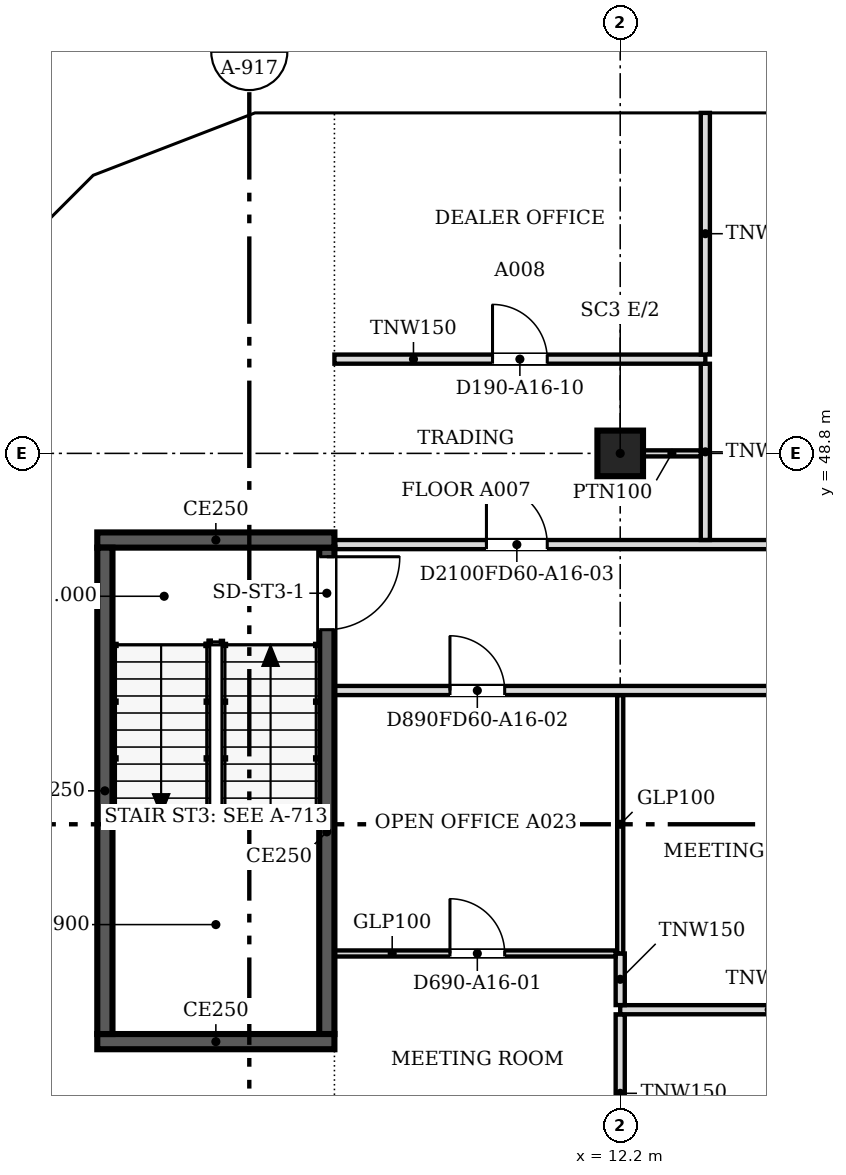
"""IFC4 building model, lengths in metres.
Left out: names, types, materials, properties, quantities, classifications, styles, units other than length and angle.
Written with IfcOpenShell. Run it as: python <this file> out.ifc"""

import sys

from ifc_helpers import new_model, si_unit, direction, frame, frame_2d, origin, origin_2d, place, context, subcontext, project, spatial, polyline, rectangle, outline, extrude, faceted_brep, source, transform, mapped, element, fill, save


model = new_model("IFC4")
c1 = context("Model", 3, precision=1e-05, world=origin(), true_north=direction((0.0, 1.0)))
c2 = subcontext(c1, "Body", "Model", "MODEL_VIEW")
j1 = project(units=[si_unit("LENGTHUNIT", "METRE"), si_unit("PLANEANGLEUNIT", "RADIAN")], contexts=[c1])
p1 = place(None, origin())
s1 = spatial("IfcSite", under=j1, at=p1, CompositionType="ELEMENT")
p2 = place(p1, origin())
s2 = spatial("IfcBuilding", under=s1, at=p2, CompositionType="ELEMENT")
p3 = place(p2, frame((0.0, 0.0, 178.2)))
s3 = spatial("IfcBuildingStorey", under=s2, at=p3, CompositionType="ELEMENT", Elevation=178.2)
p4 = place(p3, frame((12.2, 48.8, 0.0), z_axis=(0.0, 0.0, 1.0), x_axis=(1.0, 0.0, 0.0)))
e1 = element("IfcColumn", 1, at=p4, inside=s3, PredefinedType="COLUMN", context=c2, shape_type="SweptSolid", body=[
    extrude(rectangle(XDim=0.75, YDim=0.75, at=origin_2d()), origin(), (0.0, 0.0, 1.0), 3.6),
])
m1 = source(origin(), c2, "Body", "SweptSolid", [
    extrude(outline(polyline([(3.05, 0.0), (6.1, 3.8), (3.05, 7.6), (0.0, 3.8), (3.05, 0.0)])), frame((0.0, 0.25, 0.0), z_axis=(0.0, -1.0, 0.0), x_axis=(1.0, 0.0, 0.0)), (0.0, 0.0, 1.0), 0.5),
])
p5 = place(p3, frame((15.25, 54.65, -3.8), z_axis=(0.0, 0.0, 1.0), x_axis=(-1.0, 0.0, 0.0)))
e2 = element("IfcWall", 2, at=p5, inside=s3, PredefinedType="SOLIDWALL", context=c2, shape_type="MappedRepresentation", body=[
    mapped(m1, transform((0.0, 0.0, 0.0), scale=1.0)),
])
m2 = source(origin(), c2, "Body", "SweptSolid", [
    extrude(outline(polyline([(3.05, 0.399), (5.78, 3.8), (3.05, 7.201), (0.321, 3.8), (3.05, 0.399)])), frame((0.0, 0.26, 0.0), z_axis=(0.0, -1.0, 0.0), x_axis=(1.0, 0.0, 0.0)), (0.0, 0.0, 1.0), 0.52),
])
p6 = place(p5, origin())
e3 = element("IfcOpeningElement", 3, at=p6, cuts=e2, PredefinedType="OPENING", context=c2, shape_type="MappedRepresentation", body=[
    mapped(m2, transform((0.0, 0.0, 0.0), scale=1.0)),
])
m3 = source(origin(), c2, "Body", "Brep", [
    faceted_brep([(3.003, -0.25, 0.0), (3.05, -0.25, 0.06), (3.05, -0.25, 7.54), (3.003, -0.25, 7.6), (0.0, -0.25, 3.8), (0.0, 0.25, 3.8), (2.957, 0.25, 7.541), (2.957, 0.25, 0.059), (3.003, 0.0, 0.0), (3.003, 0.0, 7.6)], [[[0, 1, 2, 3, 4]], [[5, 6, 7]], [[1, 0, 8]], [[9, 3, 2]], [[6, 5, 4, 3, 9]], [[5, 7, 8, 0, 4]], [[1, 8, 7, 6, 9, 2]]]),
])
p7 = place(p3, frame((9.15, 54.65, -3.8), z_axis=(0.0, 0.0, 1.0), x_axis=(-1.0, 0.0, 0.0)))
e4 = element("IfcWall", 4, at=p7, inside=s3, PredefinedType="SOLIDWALL", context=c2, shape_type="MappedRepresentation", body=[
    mapped(m3, transform((0.0, 0.0, 0.0), scale=1.0)),
])
m4 = source(origin(), c2, "Body", "SweptSolid", [
    extrude(outline(polyline([(2.803, 6.944), (0.319, 3.8), (2.803, 0.656), (2.803, 6.944)])), frame((0.0, 0.26, 0.0), z_axis=(0.0, -1.0, 0.0), x_axis=(1.0, 0.0, 0.0)), (0.0, 0.0, 1.0), 0.52),
])
p8 = place(p7, origin())
e5 = element("IfcOpeningElement", 5, at=p8, cuts=e4, PredefinedType="OPENING", context=c2, shape_type="MappedRepresentation", body=[
    mapped(m4, transform((0.0, 0.0, 0.0), scale=1.0)),
])
m5 = source(origin(), c2, "Body", "Brep", [
    faceted_brep([(0.047, -0.25, 0.0), (2.997, -0.25, 3.8), (0.047, -0.25, 7.6), (0.0, -0.25, 7.541), (0.0, -0.25, 0.059), (0.093, 0.25, 7.54), (2.944, 0.25, 3.868), (2.944, 0.25, 3.732), (0.093, 0.25, 0.06), (2.997, 0.0, 3.8), (0.047, 0.0, 0.0), (0.047, 0.0, 7.6)], [[[0, 1, 2, 3, 4]], [[5, 6, 7, 8]], [[8, 7, 9, 1, 0, 10]], [[6, 5, 11, 2, 1, 9]], [[3, 2, 11]], [[10, 0, 4]], [[8, 10, 4, 3, 11, 5]], [[9, 7, 6]]]),
])
p9 = place(p3, frame((6.19, 54.667, -3.8), z_axis=(0.0, 0.0, 1.0), x_axis=(-0.932990326376, -0.359901446078, 0.0)))
e6 = element("IfcWall", 6, at=p9, inside=s3, PredefinedType="SOLIDWALL", context=c2, shape_type="MappedRepresentation", body=[
    mapped(m5, transform((0.0, 0.0, 0.0), scale=1.0)),
])
m6 = source(origin(), c2, "Body", "SweptSolid", [
    extrude(outline(polyline([(0.247, 0.665), (2.681, 3.8), (0.247, 6.935), (0.247, 0.665)])), frame((0.0, 0.26, 0.0), z_axis=(0.0, -1.0, 0.0), x_axis=(1.0, 0.0, 0.0)), (0.0, 0.0, 1.0), 0.52),
])
p10 = place(p9, origin())
e7 = element("IfcOpeningElement", 7, at=p10, cuts=e6, PredefinedType="OPENING", context=c2, shape_type="MappedRepresentation", body=[
    mapped(m6, transform((0.0, 0.0, 0.0), scale=1.0)),
])
m7 = source(origin(), c2, "Body", "Brep", [
    faceted_brep([(2.944, -0.25, 0.0), (2.997, -0.25, 0.068), (2.997, -0.25, 7.532), (2.944, -0.25, 7.6), (0.0, -0.25, 3.8), (0.053, 0.25, 3.868), (2.891, 0.25, 7.532), (2.891, 0.25, 0.068), (0.053, 0.25, 3.732), (2.944, 0.0, 0.0), (2.944, 0.0, 7.6), (0.0, 0.0, 3.8)], [[[0, 1, 2, 3, 4]], [[5, 6, 7, 8]], [[1, 0, 9]], [[10, 3, 2]], [[6, 5, 11, 4, 3, 10]], [[8, 7, 9, 0, 4, 11]], [[8, 11, 5]], [[1, 9, 7, 6, 10, 2]]]),
])
p11 = place(p3, frame((3.394, 53.588, -3.8), z_axis=(0.0, 0.0, 1.0), x_axis=(-0.707106781187, -0.707106781187, 0.0)))
e8 = element("IfcWall", 8, at=p11, inside=s3, PredefinedType="SOLIDWALL", context=c2, shape_type="MappedRepresentation", body=[
    mapped(m7, transform((0.0, 0.0, 0.0), scale=1.0)),
])
m8 = source(origin(), c2, "Body", "SweptSolid", [
    extrude(outline(polyline([(2.744, 6.934), (0.316, 3.8), (2.744, 0.667), (2.744, 6.934)])), frame((0.0, 0.26, 0.0), z_axis=(0.0, -1.0, 0.0), x_axis=(1.0, 0.0, 0.0)), (0.0, 0.0, 1.0), 0.52),
])
p12 = place(p11, origin())
e9 = element("IfcOpeningElement", 9, at=p12, cuts=e8, PredefinedType="OPENING", context=c2, shape_type="MappedRepresentation", body=[
    mapped(m8, transform((0.0, 0.0, 0.0), scale=1.0)),
])
p13 = place(p2, frame((0.0, 0.0, 182.0)))
s4 = spatial("IfcBuildingStorey", under=s2, at=p13, CompositionType="ELEMENT", Elevation=182.0)
p14 = place(p13, frame((18.3, 54.65, -3.8), z_axis=(0.0, 0.0, 1.0), x_axis=(-1.0, 0.0, 0.0)))
e10 = element("IfcWall", 10, at=p14, inside=s4, PredefinedType="SOLIDWALL", context=c2, shape_type="MappedRepresentation", body=[
    mapped(m1, transform((0.0, 0.0, 0.0), scale=1.0)),
])
p15 = place(p14, origin())
e11 = element("IfcOpeningElement", 11, at=p15, cuts=e10, PredefinedType="OPENING", context=c2, shape_type="MappedRepresentation", body=[
    mapped(m2, transform((0.0, 0.0, 0.0), scale=1.0)),
])
m9 = source(origin(), c2, "Body", "Brep", [
    faceted_brep([(3.05, -0.25, 0.0), (6.053, -0.25, 3.8), (3.05, -0.25, 7.6), (0.0, -0.25, 3.8), (0.0, 0.25, 3.8), (3.05, 0.25, 7.6), (6.007, 0.25, 3.859), (6.007, 0.25, 3.741), (3.05, 0.25, 0.0), (6.053, 0.0, 3.8)], [[[0, 1, 2, 3]], [[4, 5, 6, 7, 8]], [[8, 7, 9, 1, 0]], [[6, 5, 2, 1, 9]], [[5, 4, 3, 2]], [[4, 8, 0, 3]], [[9, 7, 6]]]),
])
p16 = place(p13, frame((12.2, 54.65, -3.8), z_axis=(0.0, 0.0, 1.0), x_axis=(-1.0, 0.0, 0.0)))
e12 = element("IfcWall", 12, at=p16, inside=s4, PredefinedType="SOLIDWALL", context=c2, shape_type="MappedRepresentation", body=[
    mapped(m9, transform((0.0, 0.0, 0.0), scale=1.0)),
])
m10 = source(origin(), c2, "Body", "SweptSolid", [
    extrude(outline(polyline([(3.049, 0.401), (5.735, 3.8), (3.049, 7.199), (0.321, 3.8), (3.049, 0.401)])), frame((0.0, 0.26, 0.0), z_axis=(0.0, -1.0, 0.0), x_axis=(1.0, 0.0, 0.0)), (0.0, 0.0, 1.0), 0.52),
])
p17 = place(p16, origin())
e13 = element("IfcOpeningElement", 13, at=p17, cuts=e12, PredefinedType="OPENING", context=c2, shape_type="MappedRepresentation", body=[
    mapped(m10, transform((0.0, 0.0, 0.0), scale=1.0)),
])
m11 = source(origin(), c2, "Body", "Brep", [
    faceted_brep([(2.95, -0.25, 0.0), (3.003, -0.25, 0.068), (3.003, -0.25, 7.532), (2.95, -0.25, 7.6), (0.0, -0.25, 3.8), (0.047, 0.25, 3.86), (2.898, 0.25, 7.532), (2.898, 0.25, 0.068), (0.047, 0.25, 3.74), (2.95, 0.0, 0.0), (2.95, 0.0, 7.6), (0.0, 0.0, 3.8)], [[[0, 1, 2, 3, 4]], [[5, 6, 7, 8]], [[1, 0, 9]], [[10, 3, 2]], [[6, 5, 11, 4, 3, 10]], [[8, 7, 9, 0, 4, 11]], [[8, 11, 5]], [[1, 9, 7, 6, 10, 2]]]),
])
p18 = place(p13, frame((6.146, 54.65, -3.8), z_axis=(0.0, 0.0, 1.0), x_axis=(-0.932997369089, -0.359883188373, 0.0)))
e14 = element("IfcWall", 14, at=p18, inside=s4, PredefinedType="SOLIDWALL", context=c2, shape_type="MappedRepresentation", body=[
    mapped(m11, transform((0.0, 0.0, 0.0), scale=1.0)),
])
m12 = source(origin(), c2, "Body", "SweptSolid", [
    extrude(outline(polyline([(2.75, 6.935), (0.316, 3.8), (2.75, 0.665), (2.75, 6.935)])), frame((0.0, 0.26, 0.0), z_axis=(0.0, -1.0, 0.0), x_axis=(1.0, 0.0, 0.0)), (0.0, 0.0, 1.0), 0.52),
])
p19 = place(p18, origin())
e15 = element("IfcOpeningElement", 15, at=p19, cuts=e14, PredefinedType="OPENING", context=c2, shape_type="MappedRepresentation", body=[
    mapped(m12, transform((0.0, 0.0, 0.0), scale=1.0)),
])
m13 = source(origin(), c2, "Body", "Brep", [
    faceted_brep([(0.053, -0.25, 0.0), (2.997, -0.25, 3.8), (0.053, -0.25, 7.6), (0.0, -0.25, 7.532), (0.0, -0.25, 0.068), (0.106, 0.25, 7.532), (2.944, 0.25, 3.868), (2.944, 0.25, 3.732), (0.106, 0.25, 0.068), (2.997, 0.0, 3.8), (0.053, 0.0, 0.0), (0.053, 0.0, 7.6)], [[[0, 1, 2, 3, 4]], [[5, 6, 7, 8]], [[8, 7, 9, 1, 0, 10]], [[6, 5, 11, 2, 1, 9]], [[3, 2, 11]], [[10, 0, 4]], [[8, 10, 4, 3, 11, 5]], [[9, 7, 6]]]),
])
p20 = place(p13, frame((3.431, 53.625, -3.8), z_axis=(0.0, 0.0, 1.0), x_axis=(-0.707106781187, -0.707106781187, 0.0)))
e16 = element("IfcWall", 16, at=p20, inside=s4, PredefinedType="SOLIDWALL", context=c2, shape_type="MappedRepresentation", body=[
    mapped(m13, transform((0.0, 0.0, 0.0), scale=1.0)),
])
m14 = source(origin(), c2, "Body", "SweptSolid", [
    extrude(outline(polyline([(0.253, 0.666), (2.681, 3.8), (0.253, 6.934), (0.253, 0.666)])), frame((0.0, 0.26, 0.0), z_axis=(0.0, -1.0, 0.0), x_axis=(1.0, 0.0, 0.0)), (0.0, 0.0, 1.0), 0.52),
])
p21 = place(p20, origin())
e17 = element("IfcOpeningElement", 17, at=p21, cuts=e16, PredefinedType="OPENING", context=c2, shape_type="MappedRepresentation", body=[
    mapped(m14, transform((0.0, 0.0, 0.0), scale=1.0)),
])
p22 = place(p3, frame((7.5, 39.125, 0.0), z_axis=(0.0, 0.0, 1.0), x_axis=(-1.0, 0.0, 0.0)))
e18 = element("IfcWall", 18, at=p22, inside=s3, PredefinedType="SOLIDWALL", context=c2, shape_type="SweptSolid", body=[
    extrude(rectangle(XDim=3.9, YDim=0.25, at=frame_2d((1.95, 0.0))), origin(), (0.0, 0.0, 1.0), 3.8),
])
p23 = place(p3, frame((3.725, 39.25, 0.0), z_axis=(0.0, 0.0, 1.0), x_axis=(0.0, 1.0, 0.0)))
e19 = element("IfcWall", 19, at=p23, inside=s3, PredefinedType="SOLIDWALL", context=c2, shape_type="SweptSolid", body=[
    extrude(rectangle(XDim=8.0, YDim=0.25, at=frame_2d((4.0, 0.0))), origin(), (0.0, 0.0, 1.0), 3.8),
])
p24 = place(p3, frame((3.6, 47.375, 0.0), z_axis=(0.0, 0.0, 1.0), x_axis=(1.0, 0.0, 0.0)))
e20 = element("IfcWall", 20, at=p24, inside=s3, PredefinedType="SOLIDWALL", context=c2, shape_type="SweptSolid", body=[
    extrude(rectangle(XDim=3.9, YDim=0.25, at=frame_2d((1.95, 0.0))), origin(), (0.0, 0.0, 1.0), 3.8),
])
p25 = place(p3, frame((7.375, 47.25, 0.0), z_axis=(0.0, 0.0, 1.0), x_axis=(0.0, -1.0, 0.0)))
e21 = element("IfcWall", 21, at=p25, inside=s3, PredefinedType="SOLIDWALL", context=c2, shape_type="SweptSolid", body=[
    extrude(rectangle(XDim=8.0, YDim=0.25, at=frame_2d((4.0, 0.0))), origin(), (0.0, 0.0, 1.0), 3.8),
])
m15 = source(origin(), c2, "Body", "SweptSolid", [
    extrude(rectangle(XDim=1.2, YDim=2.1, at=frame_2d((0.6, 1.05))), frame((0.0, 0.135, 0.0), z_axis=(0.0, -1.0, 0.0), x_axis=(1.0, 0.0, 0.0)), (0.0, 0.0, 1.0), 0.27),
])
p26 = place(p25, frame((0.15, 0.0, 0.0)))
e22 = element("IfcOpeningElement", 22, at=p26, cuts=e21, PredefinedType="OPENING", context=c2, shape_type="MappedRepresentation", body=[
    mapped(m15, transform((0.0, 0.0, 0.0), scale=1.0)),
])
p27 = place(p3, frame((12.2, 36.976, 0.0), z_axis=(0.0, 0.0, 1.0), x_axis=(0.0, 1.0, 0.0)))
e23 = element("IfcWall", 23, at=p27, inside=s3, PredefinedType="PARTITIONING", context=c2, shape_type="SweptSolid", body=[
    extrude(rectangle(XDim=2.598, YDim=0.15, at=frame_2d((1.299, 0.0))), origin(), (0.0, 0.0, 1.0), 3.067),
])
p28 = place(p3, frame((12.2, 39.65, 0.0), z_axis=(0.0, 0.0, 1.0), x_axis=(1.0, 0.0, 0.0)))
e24 = element("IfcWall", 24, at=p28, inside=s3, PredefinedType="PARTITIONING", context=c2, shape_type="SweptSolid", body=[
    extrude(rectangle(XDim=4.9, YDim=0.15, at=frame_2d((2.45, 0.0))), origin(), (0.0, 0.0, 1.0), 3.067),
])
p29 = place(p3, frame((12.2, 39.726, 0.0), z_axis=(0.0, 0.0, 1.0), x_axis=(0.0, 1.0, 0.0)))
e25 = element("IfcWall", 25, at=p29, inside=s3, PredefinedType="PARTITIONING", context=c2, shape_type="SweptSolid", body=[
    extrude(rectangle(XDim=0.849, YDim=0.15, at=frame_2d((0.424, 0.0))), origin(), (0.0, 0.0, 1.0), 3.067),
])
p30 = place(p3, frame((12.124, 40.575, 0.0), z_axis=(0.0, 0.0, 1.0), x_axis=(-1.0, 0.0, 0.0)))
e26 = element("IfcWall", 26, at=p30, inside=s3, PredefinedType="PARTITIONING", context=c2, shape_type="SweptSolid", body=[
    extrude(rectangle(XDim=4.624, YDim=0.1, at=frame_2d((2.312, 0.0))), origin(), (0.0, 0.0, 1.0), 3.067),
])
m16 = source(origin(), c2, "Body", "SweptSolid", [
    extrude(rectangle(XDim=0.9, YDim=2.1, at=frame_2d((0.45, 1.05))), frame((0.0, 0.06, 0.0), z_axis=(0.0, -1.0, 0.0), x_axis=(1.0, 0.0, 0.0)), (0.0, 0.0, 1.0), 0.12),
])
p31 = place(p30, frame((1.824, 0.0, 0.0)))
e27 = element("IfcOpeningElement", 27, at=p31, cuts=e26, PredefinedType="OPENING", context=c2, shape_type="MappedRepresentation", body=[
    mapped(m16, transform((0.0, 0.0, 0.0), scale=1.0)),
])
p32 = place(p3, frame((12.2, 40.576, 0.0), z_axis=(0.0, 0.0, 1.0), x_axis=(0.0, 1.0, 0.0)))
e28 = element("IfcWall", 28, at=p32, inside=s3, PredefinedType="PARTITIONING", context=c2, shape_type="SweptSolid", body=[
    extrude(rectangle(XDim=4.248, YDim=0.1, at=frame_2d((2.124, 0.0))), origin(), (0.0, 0.0, 1.0), 3.067),
])
p33 = place(p3, frame((28.1, 44.9, 0.0), z_axis=(0.0, 0.0, 1.0), x_axis=(-1.0, 0.0, 0.0)))
e29 = element("IfcWall", 29, at=p33, inside=s3, PredefinedType="PARTITIONING", context=c2, shape_type="SweptSolid", body=[
    extrude(rectangle(XDim=20.6, YDim=0.15, at=frame_2d((10.3, 0.0))), origin(), (0.0, 0.0, 1.0), 3.067),
])
m17 = source(origin(), c2, "Body", "SweptSolid", [
    extrude(rectangle(XDim=0.9, YDim=2.1, at=frame_2d((0.45, 1.05))), frame((0.0, 0.085, 0.0), z_axis=(0.0, -1.0, 0.0), x_axis=(1.0, 0.0, 0.0)), (0.0, 0.0, 1.0), 0.17),
])
p34 = place(p33, frame((17.8, 0.0, 0.0)))
e30 = element("IfcOpeningElement", 30, at=p34, cuts=e29, PredefinedType="OPENING", context=c2, shape_type="MappedRepresentation", body=[
    mapped(m17, transform((0.0, 0.0, 0.0), scale=1.0)),
])
p35 = place(p3, frame((7.5, 47.3, 0.0), z_axis=(0.0, 0.0, 1.0), x_axis=(1.0, 0.0, 0.0)))
e31 = element("IfcWall", 31, at=p35, inside=s3, PredefinedType="PARTITIONING", context=c2, shape_type="SweptSolid", body=[
    extrude(rectangle(XDim=20.6, YDim=0.15, at=frame_2d((10.3, 0.0))), origin(), (0.0, 0.0, 1.0), 3.067),
])
m18 = source(origin(), c2, "Body", "SweptSolid", [
    extrude(rectangle(XDim=1.0, YDim=2.1, at=frame_2d((0.5, 1.05))), frame((0.0, 0.085, 0.0), z_axis=(0.0, -1.0, 0.0), x_axis=(1.0, 0.0, 0.0)), (0.0, 0.0, 1.0), 0.17),
])
p36 = place(p35, frame((2.5, 0.0, 0.0)))
e32 = element("IfcOpeningElement", 32, at=p36, cuts=e31, PredefinedType="OPENING", context=c2, shape_type="MappedRepresentation", body=[
    mapped(m18, transform((0.0, 0.0, 0.0), scale=1.0)),
])
p37 = place(p35, frame((12.8, 0.0, 0.0)))
e33 = element("IfcOpeningElement", 33, at=p37, cuts=e31, PredefinedType="OPENING", context=c2, shape_type="MappedRepresentation", body=[
    mapped(m18, transform((0.0, 0.0, 0.0), scale=1.0)),
])
p38 = place(p3, frame((13.6, 47.376, 0.0), z_axis=(0.0, 0.0, 1.0), x_axis=(0.0, 1.0, 0.0)))
e34 = element("IfcWall", 34, at=p38, inside=s3, PredefinedType="PARTITIONING", context=c2, shape_type="SweptSolid", body=[
    extrude(rectangle(XDim=2.898, YDim=0.15, at=frame_2d((1.449, 0.0))), origin(), (0.0, 0.0, 1.0), 3.067),
])
p39 = place(p3, frame((12.575, 48.8, 0.0), z_axis=(0.0, 0.0, 1.0), x_axis=(1.0, 0.0, 0.0)))
e35 = element("IfcWall", 35, at=p39, inside=s3, PredefinedType="PARTITIONING", context=c2, shape_type="SweptSolid", body=[
    extrude(rectangle(XDim=0.95, YDim=0.1, at=frame_2d((0.475, 0.0))), origin(), (0.0, 0.0, 1.0), 3.067),
])
p40 = place(p3, frame((7.5, 50.35, 0.0), z_axis=(0.0, 0.0, 1.0), x_axis=(1.0, 0.0, 0.0)))
e36 = element("IfcWall", 36, at=p40, inside=s3, PredefinedType="PARTITIONING", context=c2, shape_type="SweptSolid", body=[
    extrude(rectangle(XDim=6.1, YDim=0.15, at=frame_2d((3.05, 0.0))), origin(), (0.0, 0.0, 1.0), 3.067),
])
p41 = place(p40, frame((2.6, 0.0, 0.0)))
e37 = element("IfcOpeningElement", 37, at=p41, cuts=e36, PredefinedType="OPENING", context=c2, shape_type="MappedRepresentation", body=[
    mapped(m17, transform((0.0, 0.0, 0.0), scale=1.0)),
])
p42 = place(p3, frame((13.6, 50.426, 0.0), z_axis=(0.0, 0.0, 1.0), x_axis=(0.0, 1.0, 0.0)))
e38 = element("IfcWall", 38, at=p42, inside=s3, PredefinedType="PARTITIONING", context=c2, shape_type="SweptSolid", body=[
    extrude(rectangle(XDim=3.974, YDim=0.15, at=frame_2d((1.987, 0.0))), origin(), (0.0, 0.0, 1.0), 3.067),
])
m19 = source(origin(), c2, "Body", "SweptSolid", [
    extrude(rectangle(XDim=1.2, YDim=2.1, at=frame_2d((0.6, 1.05))), frame((0.0, 0.025, 0.0), z_axis=(0.0, -1.0, 0.0), x_axis=(1.0, 0.0, 0.0)), (0.0, 0.0, 1.0), 0.05),
])
p43 = place(p26, origin())
e39 = element("IfcDoor", 39, at=p43, inside=s3, OperationType="SINGLE_SWING_LEFT", PredefinedType="DOOR", context=c2, shape_type="MappedRepresentation", body=[
    mapped(m19, transform((0.0, 0.0, 0.0), scale=1.0)),
])
fill(e22, e39)
m20 = source(origin(), c2, "Body", "SweptSolid", [
    extrude(rectangle(XDim=0.9, YDim=2.1, at=frame_2d((0.45, 1.05))), frame((0.0, 0.025, 0.0), z_axis=(0.0, -1.0, 0.0), x_axis=(1.0, 0.0, 0.0)), (0.0, 0.0, 1.0), 0.05),
])
p44 = place(p31, origin())
e40 = element("IfcDoor", 40, at=p44, inside=s3, OperationType="SINGLE_SWING_RIGHT", PredefinedType="DOOR", context=c2, shape_type="MappedRepresentation", body=[
    mapped(m20, transform((0.0, 0.0, 0.0), scale=1.0)),
])
fill(e27, e40)
p45 = place(p34, origin())
e41 = element("IfcDoor", 41, at=p45, inside=s3, OperationType="SINGLE_SWING_RIGHT", PredefinedType="DOOR", context=c2, shape_type="MappedRepresentation", body=[
    mapped(m20, transform((0.0, 0.0, 0.0), scale=1.0)),
])
fill(e30, e41)
m21 = source(origin(), c2, "Body", "SweptSolid", [
    extrude(rectangle(XDim=1.0, YDim=2.1, at=frame_2d((0.5, 1.05))), frame((0.0, 0.025, 0.0), z_axis=(0.0, -1.0, 0.0), x_axis=(1.0, 0.0, 0.0)), (0.0, 0.0, 1.0), 0.05),
])
p46 = place(p36, origin())
e42 = element("IfcDoor", 42, at=p46, inside=s3, OperationType="SINGLE_SWING_LEFT", PredefinedType="DOOR", context=c2, shape_type="MappedRepresentation", body=[
    mapped(m21, transform((0.0, 0.0, 0.0), scale=1.0)),
])
fill(e32, e42)
p47 = place(p41, origin())
e43 = element("IfcDoor", 43, at=p47, inside=s3, OperationType="SINGLE_SWING_LEFT", PredefinedType="DOOR", context=c2, shape_type="MappedRepresentation", body=[
    mapped(m20, transform((0.0, 0.0, 0.0), scale=1.0)),
])
fill(e37, e43)
save(model, sys.argv[1])
